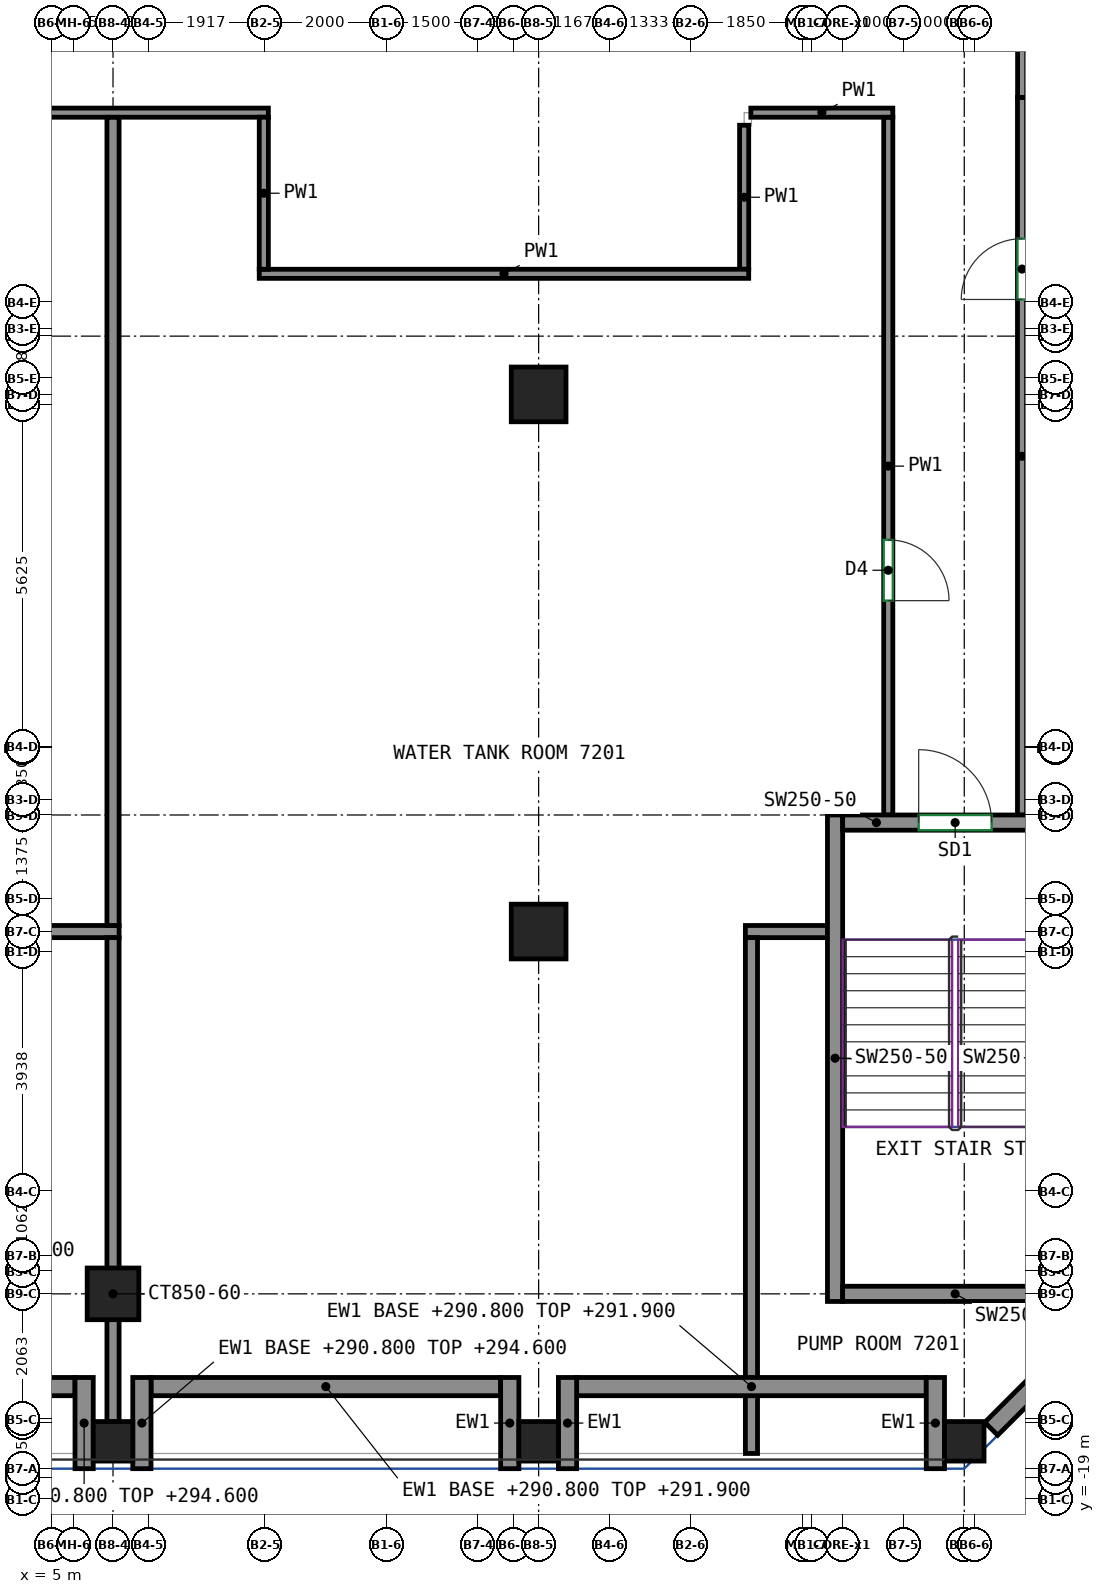
"""IFC4 building model, lengths in metres.
Left out: names, types, materials, properties, quantities, classifications, styles, units other than length and angle.
Written with IfcOpenShell. Run it as: python <this file> out.ifc"""

import sys

from ifc_helpers import new_model, si_unit, direction, frame, frame_2d, origin, origin_2d, place, context, subcontext, project, spatial, rectangle, extrude, source, transform, mapped, element, fill, save


model = new_model("IFC4")
c1 = context("Model", 3, precision=1e-05, world=origin(), true_north=direction((0.0, 1.0)))
c2 = subcontext(c1, "Body", "Model", "MODEL_VIEW")
j1 = project(units=[si_unit("LENGTHUNIT", "METRE"), si_unit("PLANEANGLEUNIT", "RADIAN")], contexts=[c1])
p1 = place(None, origin())
s1 = spatial("IfcSite", under=j1, at=p1, CompositionType="ELEMENT")
p2 = place(p1, origin())
s2 = spatial("IfcBuilding", under=s1, at=p2, CompositionType="ELEMENT")
p3 = place(p2, frame((0.0, 0.0, 290.8)))
s3 = spatial("IfcBuildingStorey", under=s2, at=p3, CompositionType="ELEMENT", Elevation=290.8)
m1 = source(origin(), c2, "Body", "SweptSolid", [
    extrude(rectangle(XDim=0.65, YDim=0.65, at=origin_2d()), origin(), (0.0, 0.0, 1.0), 3.8),
])
p4 = place(p3, frame((6.0, -18.05, 0.0), z_axis=(0.0, 0.0, 1.0), x_axis=(1.0, 0.0, 0.0)))
e1 = element("IfcColumn", 1, at=p4, inside=s3, PredefinedType="COLUMN", context=c2, shape_type="MappedRepresentation", body=[
    mapped(m1, transform((0.0, 0.0, 0.0))),
])
m2 = source(origin(), c2, "Body", "SweptSolid", [
    extrude(rectangle(XDim=0.65, YDim=0.65, at=origin_2d()), origin(), (0.0, 0.0, 1.0), 2.3),
])
p5 = place(p3, frame((13.0, -18.05, 0.0), z_axis=(0.0, 0.0, 1.0), x_axis=(1.0, 0.0, 0.0)))
e2 = element("IfcColumn", 2, at=p5, inside=s3, PredefinedType="COLUMN", context=c2, shape_type="MappedRepresentation", body=[
    mapped(m2, transform((0.0, 0.0, 0.0))),
])
m3 = source(origin(), c2, "Body", "SweptSolid", [
    extrude(rectangle(XDim=0.9, YDim=0.9, at=origin_2d()), origin(), (0.0, 0.0, 1.0), 2.3),
])
for number, where, z_axis, x_axis in (
    (3, (13.0, -9.667, 0.0), (0.0, 0.0, 1.0), (1.0, 0.0, 0.0)),
    (4, (13.0, -0.833, 0.0), (0.0, 0.0, 1.0), (1.0, 0.0, 0.0)),
):
    element("IfcColumn", number, at=place(p3, frame(where, z_axis=z_axis, x_axis=x_axis)), inside=s3, PredefinedType="COLUMN", context=c2, shape_type="MappedRepresentation", body=[
        mapped(m3, transform((0.0, 0.0, 0.0))),
    ])
p6 = place(p3, frame((20.0, -18.05, 0.0), z_axis=(0.0, 0.0, 1.0), x_axis=(1.0, 0.0, 0.0)))
e5 = element("IfcColumn", 5, at=p6, inside=s3, PredefinedType="COLUMN", context=c2, shape_type="MappedRepresentation", body=[
    mapped(m2, transform((0.0, 0.0, 0.0))),
])
m4 = source(origin(), c2, "Body", "SweptSolid", [
    extrude(rectangle(XDim=0.85, YDim=0.85, at=origin_2d()), origin(), (0.0, 0.0, 1.0), 3.8),
])
p7 = place(p3, frame((6.0, -15.625, 0.0), z_axis=(0.0, 0.0, 1.0), x_axis=(1.0, 0.0, 0.0)))
e6 = element("IfcColumn", 6, at=p7, inside=s3, PredefinedType="COLUMN", context=c2, shape_type="MappedRepresentation", body=[
    mapped(m4, transform((0.0, 0.0, 0.0))),
])
m5 = source(origin(), c2, "Body", "SweptSolid", [
    extrude(rectangle(XDim=8.0, YDim=0.25, at=frame_2d((4.0, 0.0))), origin(), (0.0, 0.0, 1.0), 3.8),
])
p8 = place(p3, frame((17.875, -15.75, 0.0), z_axis=(0.0, 0.0, 1.0), x_axis=(0.0, 1.0, 0.0)))
e7 = element("IfcWall", 7, at=p8, inside=s3, PredefinedType="SHEAR", context=c2, shape_type="MappedRepresentation", body=[
    mapped(m5, transform((0.0, 0.0, 0.0))),
])
m6 = source(origin(), c2, "Body", "SweptSolid", [
    extrude(rectangle(XDim=3.7, YDim=0.25, at=frame_2d((1.85, 0.0))), origin(), (0.0, 0.0, 1.0), 3.8),
])
p9 = place(p3, frame((18.0, -15.625, 0.0), z_axis=(0.0, 0.0, 1.0), x_axis=(1.0, 0.0, 0.0)))
e8 = element("IfcWall", 8, at=p9, inside=s3, PredefinedType="SHEAR", context=c2, shape_type="MappedRepresentation", body=[
    mapped(m6, transform((0.0, 0.0, 0.0))),
])
p10 = place(p3, frame((18.0, -7.875, 0.0), z_axis=(0.0, 0.0, 1.0), x_axis=(1.0, 0.0, 0.0)))
e9 = element("IfcWall", 9, at=p10, inside=s3, PredefinedType="SHEAR", context=c2, shape_type="MappedRepresentation", body=[
    mapped(m6, transform((0.0, 0.0, 0.0))),
])
p11 = place(p10, frame((1.25, 0.0, 0.0)))
e10 = element("IfcOpeningElement", 10, at=p11, cuts=e9, PredefinedType="OPENING", context=c2, shape_type="SweptSolid", body=[
    extrude(rectangle(XDim=1.2, YDim=2.1, at=frame_2d((0.6, 1.05))), frame((0.0, 0.135, 0.0), z_axis=(0.0, -1.0, 0.0), x_axis=(1.0, 0.0, 0.0)), (0.0, 0.0, 1.0), 0.27),
])
m7 = source(origin(), c2, "Body", "SweptSolid", [
    extrude(rectangle(XDim=5.75, YDim=0.3, at=frame_2d((2.875, 0.0))), origin(), (0.0, 0.0, 1.0), 1.1),
])
p12 = place(p3, frame((-0.375, -17.15, 0.0), z_axis=(0.0, 0.0, 1.0), x_axis=(1.0, 0.0, 0.0)))
e11 = element("IfcWall", 11, at=p12, inside=s3, PredefinedType="SOLIDWALL", context=c2, shape_type="MappedRepresentation", body=[
    mapped(m7, transform((0.0, 0.0, 0.0))),
])
m8 = source(origin(), c2, "Body", "SweptSolid", [
    extrude(rectangle(XDim=1.5, YDim=0.3, at=frame_2d((0.75, 0.0))), origin(), (0.0, 0.0, 1.0), 3.8),
])
p13 = place(p3, frame((5.525, -18.5, 0.0), z_axis=(0.0, 0.0, 1.0), x_axis=(0.0, 1.0, 0.0)))
e12 = element("IfcWall", 12, at=p13, inside=s3, PredefinedType="SOLIDWALL", context=c2, shape_type="MappedRepresentation", body=[
    mapped(m8, transform((0.0, 0.0, 0.0))),
])
p14 = place(p3, frame((6.625, -17.15, 0.0), z_axis=(0.0, 0.0, 1.0), x_axis=(1.0, 0.0, 0.0)))
e13 = element("IfcWall", 13, at=p14, inside=s3, PredefinedType="SOLIDWALL", context=c2, shape_type="MappedRepresentation", body=[
    mapped(m7, transform((0.0, 0.0, 0.0))),
])
p15 = place(p3, frame((6.475, -18.5, 0.0), z_axis=(0.0, 0.0, 1.0), x_axis=(0.0, 1.0, 0.0)))
e14 = element("IfcWall", 14, at=p15, inside=s3, PredefinedType="SOLIDWALL", context=c2, shape_type="MappedRepresentation", body=[
    mapped(m8, transform((0.0, 0.0, 0.0))),
])
m9 = source(origin(), c2, "Body", "SweptSolid", [
    extrude(rectangle(XDim=1.5, YDim=0.3, at=frame_2d((0.75, 0.0))), origin(), (0.0, 0.0, 1.0), 2.3),
])
p16 = place(p3, frame((12.525, -18.5, 0.0), z_axis=(0.0, 0.0, 1.0), x_axis=(0.0, 1.0, 0.0)))
e15 = element("IfcWall", 15, at=p16, inside=s3, PredefinedType="SOLIDWALL", context=c2, shape_type="MappedRepresentation", body=[
    mapped(m9, transform((0.0, 0.0, 0.0))),
])
p17 = place(p3, frame((13.625, -17.15, 0.0), z_axis=(0.0, 0.0, 1.0), x_axis=(1.0, 0.0, 0.0)))
e16 = element("IfcWall", 16, at=p17, inside=s3, PredefinedType="SOLIDWALL", context=c2, shape_type="MappedRepresentation", body=[
    mapped(m7, transform((0.0, 0.0, 0.0))),
])
for number, where, z_axis, x_axis in (
    (17, (13.475, -18.5, 0.0), (0.0, 0.0, 1.0), (0.0, 1.0, 0.0)),
    (18, (19.525, -18.5, 0.0), (0.0, 0.0, 1.0), (0.0, 1.0, 0.0)),
):
    element("IfcWall", number, at=place(p3, frame(where, z_axis=z_axis, x_axis=x_axis)), inside=s3, PredefinedType="SOLIDWALL", context=c2, shape_type="MappedRepresentation", body=[
        mapped(m9, transform((0.0, 0.0, 0.0))),
    ])
m10 = source(origin(), c2, "Body", "SweptSolid", [
    extrude(rectangle(XDim=3.712, YDim=0.3, at=frame_2d((1.856, 0.0))), origin(), (0.0, 0.0, 1.0), 2.3),
])
p18 = place(p3, frame((20.444, -17.844, 0.0), z_axis=(0.0, 0.0, 1.0), x_axis=(0.707106781187, 0.707106781187, 0.0)))
e19 = element("IfcWall", 19, at=p18, inside=s3, PredefinedType="SOLIDWALL", context=c2, shape_type="MappedRepresentation", body=[
    mapped(m10, transform((0.0, 0.0, 0.0))),
])
p19 = place(p3, frame((-3.075, 3.8, 0.0), z_axis=(0.0, 0.0, 1.0), x_axis=(1.0, 0.0, 0.0)))
e20 = element("IfcWall", 20, at=p19, inside=s3, PredefinedType="PARTITIONING", context=c2, shape_type="SweptSolid", body=[
    extrude(rectangle(XDim=11.63, YDim=0.15, at=frame_2d((5.815, 0.0))), origin(), (0.0, 0.0, 1.0), 3.8),
])
p20 = place(p19, frame((5.255, 0.0, 0.0)))
e21 = element("IfcOpeningElement", 21, at=p20, cuts=e20, PredefinedType="OPENING", context=c2, shape_type="SweptSolid", body=[
    extrude(rectangle(XDim=0.9, YDim=2.1, at=frame_2d((0.45, 1.05))), frame((0.0, 0.085, 0.0), z_axis=(0.0, -1.0, 0.0), x_axis=(1.0, 0.0, 0.0)), (0.0, 0.0, 1.0), 0.17),
])
p21 = place(p3, frame((18.75, 3.725, 0.0), z_axis=(0.0, 0.0, 1.0), x_axis=(0.0, -1.0, 0.0)))
e22 = element("IfcWall", 22, at=p21, inside=s3, PredefinedType="PARTITIONING", context=c2, shape_type="SweptSolid", body=[
    extrude(rectangle(XDim=11.475, YDim=0.15, at=frame_2d((5.738, 0.0))), origin(), (0.0, 0.0, 1.0), 3.8),
])
p22 = place(p21, frame((6.95, 0.0, 0.0)))
e23 = element("IfcOpeningElement", 23, at=p22, cuts=e22, PredefinedType="OPENING", context=c2, shape_type="SweptSolid", body=[
    extrude(rectangle(XDim=1.0, YDim=2.1, at=frame_2d((0.5, 1.05))), frame((0.0, 0.085, 0.0), z_axis=(0.0, -1.0, 0.0), x_axis=(1.0, 0.0, 0.0)), (0.0, 0.0, 1.0), 0.17),
])
p23 = place(p3, frame((16.49, 3.8, 0.0), z_axis=(0.0, 0.0, 1.0), x_axis=(1.0, 0.0, 0.0)))
e24 = element("IfcWall", 24, at=p23, inside=s3, PredefinedType="PARTITIONING", context=c2, shape_type="SweptSolid", body=[
    extrude(rectangle(XDim=2.335, YDim=0.15, at=frame_2d((1.167, 0.0))), origin(), (0.0, 0.0, 1.0), 3.8),
])
p24 = place(p3, frame((16.38, 1.225, 0.0), z_axis=(0.0, 0.0, 1.0), x_axis=(0.0, 1.0, 0.0)))
e25 = element("IfcWall", 25, at=p24, inside=s3, PredefinedType="PARTITIONING", context=c2, shape_type="SweptSolid", body=[
    extrude(rectangle(XDim=2.368, YDim=0.15, at=frame_2d((1.184, 0.0))), origin(), (0.0, 0.0, 1.0), 3.8),
])
p25 = place(p3, frame((8.405, 1.15, 0.0), z_axis=(0.0, 0.0, 1.0), x_axis=(1.0, 0.0, 0.0)))
e26 = element("IfcWall", 26, at=p25, inside=s3, PredefinedType="PARTITIONING", context=c2, shape_type="SweptSolid", body=[
    extrude(rectangle(XDim=8.05, YDim=0.15, at=frame_2d((4.025, 0.0))), origin(), (0.0, 0.0, 1.0), 3.8),
])
p26 = place(p3, frame((8.48, 3.725, 0.0), z_axis=(0.0, 0.0, 1.0), x_axis=(0.0, -1.0, 0.0)))
e27 = element("IfcWall", 27, at=p26, inside=s3, PredefinedType="PARTITIONING", context=c2, shape_type="SweptSolid", body=[
    extrude(rectangle(XDim=2.5, YDim=0.15, at=frame_2d((1.25, 0.0))), origin(), (0.0, 0.0, 1.0), 3.8),
])
p27 = place(p3, frame((20.952, 4.048, 0.0), z_axis=(0.0, 0.0, 1.0), x_axis=(0.0, 1.0, 0.0)))
e28 = element("IfcWall", 28, at=p27, inside=s3, PredefinedType="PARTITIONING", context=c2, shape_type="SweptSolid", body=[
    extrude(rectangle(XDim=3.789, YDim=0.15, at=frame_2d((1.895, 0.0))), origin(), (0.0, 0.0, 1.0), 3.8),
])
p28 = place(p3, frame((20.95, -7.75, 0.0), z_axis=(0.0, 0.0, 1.0), x_axis=(0.0, 1.0, 0.0)))
e29 = element("IfcWall", 29, at=p28, inside=s3, PredefinedType="PARTITIONING", context=c2, shape_type="SweptSolid", body=[
    extrude(rectangle(XDim=11.798, YDim=0.15, at=frame_2d((5.899, 0.0))), origin(), (0.0, 0.0, 1.0), 3.8),
])
p29 = place(p28, frame((8.478, 0.0, 0.0)))
e30 = element("IfcOpeningElement", 30, at=p29, cuts=e29, PredefinedType="OPENING", context=c2, shape_type="SweptSolid", body=[
    extrude(rectangle(XDim=1.0, YDim=2.1, at=frame_2d((0.5, 1.05))), frame((0.0, 0.085, 0.0), z_axis=(0.0, -1.0, 0.0), x_axis=(1.0, 0.0, 0.0)), (0.0, 0.0, 1.0), 0.17),
])
p30 = place(p3, frame((-4.6, -9.667, 0.0), z_axis=(0.0, 0.0, 1.0), x_axis=(1.0, 0.0, 0.0)))
e31 = element("IfcWall", 31, at=p30, inside=s3, PredefinedType="PARTITIONING", context=c2, shape_type="SweptSolid", body=[
    extrude(rectangle(XDim=10.7, YDim=0.2, at=frame_2d((5.35, 0.0))), origin(), (0.0, 0.0, 1.0), 3.8),
])
p31 = place(p3, frame((6.0, -17.725, 0.0), z_axis=(0.0, 0.0, 1.0), x_axis=(0.0, 1.0, 0.0)))
e32 = element("IfcWall", 32, at=p31, inside=s3, PredefinedType="PARTITIONING", context=c2, shape_type="SweptSolid", body=[
    extrude(rectangle(XDim=7.958, YDim=0.2, at=frame_2d((3.979, 0.0))), origin(), (0.0, 0.0, 1.0), 3.8),
])
p32 = place(p3, frame((6.0, -9.567, 0.0), z_axis=(0.0, 0.0, 1.0), x_axis=(0.0, 1.0, 0.0)))
e33 = element("IfcWall", 33, at=p32, inside=s3, PredefinedType="PARTITIONING", context=c2, shape_type="SweptSolid", body=[
    extrude(rectangle(XDim=13.29, YDim=0.2, at=frame_2d((6.645, 0.0))), origin(), (0.0, 0.0, 1.0), 3.8),
])
p33 = place(p3, frame((16.4, -9.667, 0.0), z_axis=(0.0, 0.0, 1.0), x_axis=(1.0, 0.0, 0.0)))
e34 = element("IfcWall", 34, at=p33, inside=s3, PredefinedType="PARTITIONING", context=c2, shape_type="SweptSolid", body=[
    extrude(rectangle(XDim=1.35, YDim=0.2, at=frame_2d((0.675, 0.0))), origin(), (0.0, 0.0, 1.0), 3.8),
])
p34 = place(p3, frame((16.5, -18.25, 0.0), z_axis=(0.0, 0.0, 1.0), x_axis=(0.0, 1.0, 0.0)))
e35 = element("IfcWall", 35, at=p34, inside=s3, PredefinedType="PARTITIONING", context=c2, shape_type="SweptSolid", body=[
    extrude(rectangle(XDim=0.98, YDim=0.2, at=frame_2d((0.49, 0.0))), origin(), (0.0, 0.0, 1.0), 3.8),
])
p35 = place(p3, frame((16.5, -17.03, 0.0), z_axis=(0.0, 0.0, 1.0), x_axis=(0.0, 1.0, 0.0)))
e36 = element("IfcWall", 36, at=p35, inside=s3, PredefinedType="PARTITIONING", context=c2, shape_type="SweptSolid", body=[
    extrude(rectangle(XDim=7.263, YDim=0.2, at=frame_2d((3.631, 0.0))), origin(), (0.0, 0.0, 1.0), 3.8),
])
p36 = place(p11, origin())
e37 = element("IfcDoor", 37, at=p36, inside=s3, OperationType="DOUBLE_DOOR_SINGLE_SWING", PredefinedType="DOOR", context=c2, shape_type="SweptSolid", body=[
    extrude(rectangle(XDim=1.2, YDim=2.1, at=frame_2d((0.6, 1.05))), frame((0.0, 0.025, 0.0), z_axis=(0.0, -1.0, 0.0), x_axis=(1.0, 0.0, 0.0)), (0.0, 0.0, 1.0), 0.05),
])
fill(e10, e37)
p37 = place(p22, origin())
e38 = element("IfcDoor", 38, at=p37, inside=s3, OperationType="SINGLE_SWING_RIGHT", PredefinedType="DOOR", context=c2, shape_type="SweptSolid", body=[
    extrude(rectangle(XDim=1.0, YDim=2.1, at=frame_2d((0.5, 1.05))), frame((0.0, 0.025, 0.0), z_axis=(0.0, -1.0, 0.0), x_axis=(1.0, 0.0, 0.0)), (0.0, 0.0, 1.0), 0.05),
])
fill(e23, e38)
p38 = place(p29, origin())
e39 = element("IfcDoor", 39, at=p38, inside=s3, OperationType="SINGLE_SWING_LEFT", PredefinedType="DOOR", context=c2, shape_type="SweptSolid", body=[
    extrude(rectangle(XDim=1.0, YDim=2.1, at=frame_2d((0.5, 1.05))), frame((0.0, 0.025, 0.0), z_axis=(0.0, -1.0, 0.0), x_axis=(1.0, 0.0, 0.0)), (0.0, 0.0, 1.0), 0.05),
])
fill(e30, e39)
save(model, sys.argv[1])
